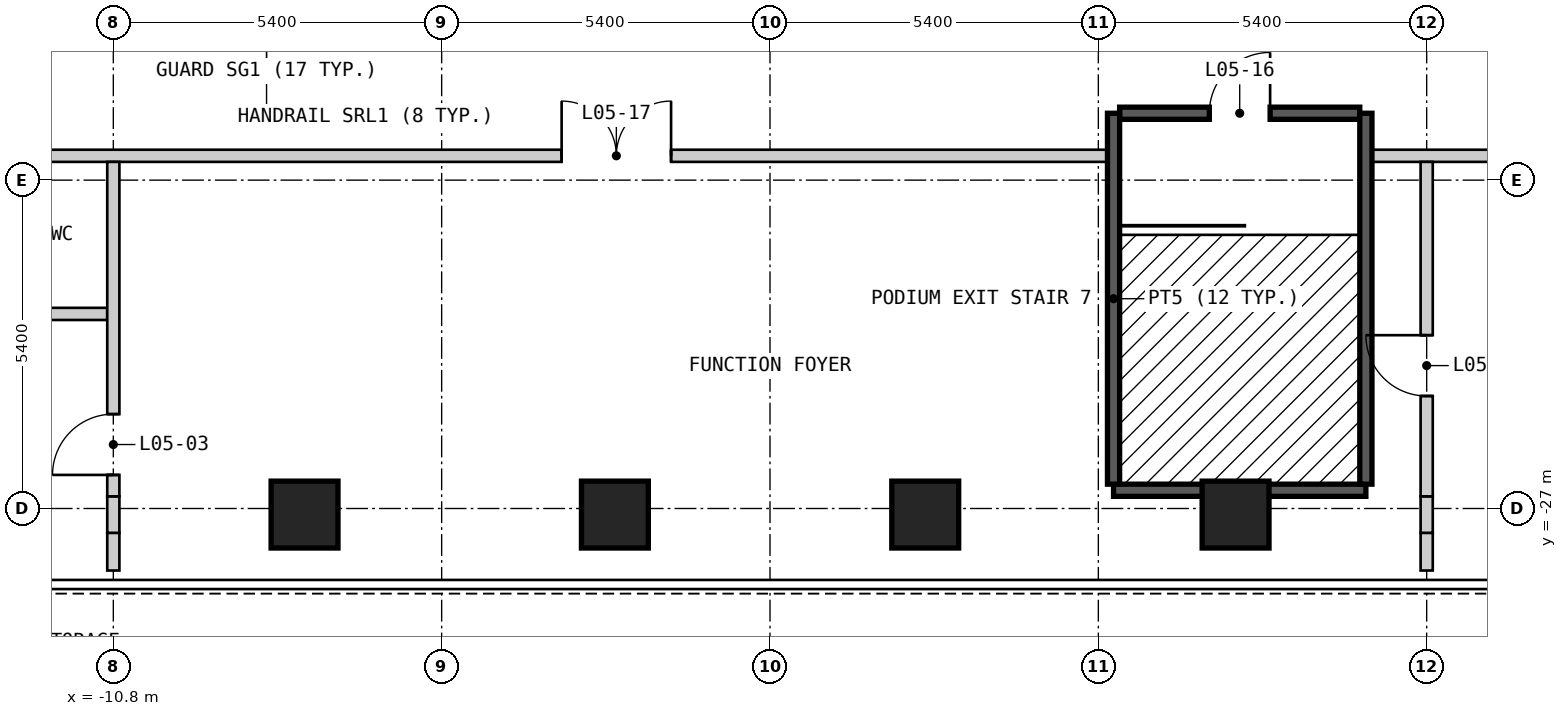
"""IFC4 building model, lengths in metres.
Left out: names, types, materials, properties, quantities, classifications, styles, units other than length and angle.
Written with IfcOpenShell. Run it as: python <this file> out.ifc"""

import sys

from ifc_helpers import new_model, si_unit, direction, frame, frame_2d, origin, origin_2d, place, context, subcontext, project, spatial, rectangle, extrude, element, fill, save


model = new_model("IFC4")
c1 = context("Model", 3, precision=1e-05, world=origin(), true_north=direction((0.0, 1.0)))
c2 = subcontext(c1, "Body", "Model", "MODEL_VIEW")
j1 = project(units=[si_unit("LENGTHUNIT", "METRE"), si_unit("PLANEANGLEUNIT", "RADIAN")], contexts=[c1])
p1 = place(None, origin())
s1 = spatial("IfcSite", under=j1, at=p1, CompositionType="ELEMENT")
p2 = place(p1, origin())
s2 = spatial("IfcBuilding", under=s1, at=p2, CompositionType="ELEMENT")
p3 = place(p2, frame((0.0, 0.0, 19.8)))
s3 = spatial("IfcBuildingStorey", under=s2, at=p3, CompositionType="ELEMENT", Elevation=19.8)
for number, where, z_axis, x_axis in (
    (1, (-7.655, -27.1, 0.0), (0.0, 0.0, 1.0), (1.0, 0.0, 0.0)),
    (2, (-2.551, -27.1, 0.0), (0.0, 0.0, 1.0), (1.0, 0.0, 0.0)),
    (3, (2.553, -27.1, 0.0), (0.0, 0.0, 1.0), (1.0, 0.0, 0.0)),
    (4, (7.657, -27.1, 0.0), (0.0, 0.0, 1.0), (1.0, 0.0, 0.0)),
):
    element("IfcColumn", number, at=place(p3, frame(where, z_axis=z_axis, x_axis=x_axis)), inside=s3, PredefinedType="COLUMN", context=c2, shape_type="SweptSolid", body=[
        extrude(rectangle(XDim=1.1, YDim=1.1, at=origin_2d()), origin(), (0.0, 0.0, 1.0), 3.6),
    ])
p4 = place(p3, frame((5.65, -26.7, 0.0), z_axis=(0.0, 0.0, 1.0), x_axis=(1.0, 0.0, 0.0)))
e5 = element("IfcWall", 5, at=p4, inside=s3, PredefinedType="SOLIDWALL", context=c2, shape_type="SweptSolid", body=[
    extrude(rectangle(XDim=4.15, YDim=0.2, at=frame_2d((2.075, 0.0))), origin(), (0.0, 0.0, 1.0), 2.8),
])
p5 = place(p3, frame((-14.5, -23.8, 0.0), z_axis=(0.0, 0.0, 1.0), x_axis=(1.0, 0.0, 0.0)))
e6 = element("IfcWall", 6, at=p5, inside=s3, PredefinedType="PARTITIONING", context=c2, shape_type="SweptSolid", body=[
    extrude(rectangle(XDim=3.6, YDim=0.2, at=frame_2d((1.8, 0.0))), origin(), (0.0, 0.0, 1.0), 2.8),
])
p6 = place(p3, frame((-18.35, -21.2, 0.0), z_axis=(0.0, 0.0, 1.0), x_axis=(1.0, 0.0, 0.0)))
e7 = element("IfcWall", 7, at=p6, inside=s3, PredefinedType="PARTITIONING", context=c2, shape_type="SweptSolid", body=[
    extrude(rectangle(XDim=24.1, YDim=0.2, at=frame_2d((12.05, 0.0))), origin(), (0.0, 0.0, 1.0), 2.8),
])
p7 = place(p6, frame((2.277, 0.0, 0.0), z_axis=(0.0, 0.0, 1.0), x_axis=(-1.0, 0.0, 0.0)))
e8 = element("IfcOpeningElement", 8, at=p7, cuts=e7, PredefinedType="OPENING", context=c2, shape_type="SweptSolid", body=[
    extrude(rectangle(XDim=0.9, YDim=2.1, at=frame_2d((0.45, 1.05))), frame((0.0, 0.11, 0.0), z_axis=(0.0, -1.0, 0.0), x_axis=(1.0, 0.0, 0.0)), (0.0, 0.0, 1.0), 0.22),
])
p8 = place(p6, frame((6.15, 0.0, 0.0), z_axis=(0.0, 0.0, 1.0), x_axis=(-1.0, 0.0, 0.0)))
e9 = element("IfcOpeningElement", 9, at=p8, cuts=e7, PredefinedType="OPENING", context=c2, shape_type="SweptSolid", body=[
    extrude(rectangle(XDim=1.0, YDim=2.1, at=frame_2d((0.5, 1.05))), frame((0.0, 0.11, 0.0), z_axis=(0.0, -1.0, 0.0), x_axis=(1.0, 0.0, 0.0)), (0.0, 0.0, 1.0), 0.22),
])
p9 = place(p6, frame((14.923, 0.0, 0.0)))
e10 = element("IfcOpeningElement", 10, at=p9, cuts=e7, PredefinedType="OPENING", context=c2, shape_type="SweptSolid", body=[
    extrude(rectangle(XDim=1.8, YDim=2.1, at=frame_2d((0.9, 1.05))), frame((0.0, 0.11, 0.0), z_axis=(0.0, -1.0, 0.0), x_axis=(1.0, 0.0, 0.0)), (0.0, 0.0, 1.0), 0.22),
])
p10 = place(p3, frame((9.7, -21.2, 0.0), z_axis=(0.0, 0.0, 1.0), x_axis=(1.0, 0.0, 0.0)))
e11 = element("IfcWall", 11, at=p10, inside=s3, PredefinedType="PARTITIONING", context=c2, shape_type="SweptSolid", body=[
    extrude(rectangle(XDim=5.7, YDim=0.2, at=frame_2d((2.85, 0.0))), origin(), (0.0, 0.0, 1.0), 2.8),
])
p11 = place(p3, frame((5.75, -20.5, 0.0), z_axis=(0.0, 0.0, 1.0), x_axis=(1.0, 0.0, 0.0)))
e12 = element("IfcWall", 12, at=p11, inside=s3, PredefinedType="SOLIDWALL", context=c2, shape_type="SweptSolid", body=[
    extrude(rectangle(XDim=3.95, YDim=0.2, at=frame_2d((1.975, 0.0))), origin(), (0.0, 0.0, 1.0), 2.8),
])
p12 = place(p11, frame((2.475, 0.0, 0.0), z_axis=(0.0, 0.0, 1.0), x_axis=(-1.0, 0.0, 0.0)))
e13 = element("IfcOpeningElement", 13, at=p12, cuts=e12, PredefinedType="OPENING", context=c2, shape_type="SweptSolid", body=[
    extrude(rectangle(XDim=1.0, YDim=2.1, at=frame_2d((0.5, 1.05))), frame((0.0, 0.11, 0.0), z_axis=(0.0, -1.0, 0.0), x_axis=(1.0, 0.0, 0.0)), (0.0, 0.0, 1.0), 0.22),
])
p13 = place(p3, frame((-10.8, -28.02, 0.0), z_axis=(0.0, 0.0, 1.0), x_axis=(0.0, 1.0, 0.0)))
e14 = element("IfcWall", 14, at=p13, inside=s3, PredefinedType="PARTITIONING", context=c2, shape_type="SweptSolid", body=[
    extrude(rectangle(XDim=0.62, YDim=0.2, at=frame_2d((0.31, 0.0))), origin(), (0.0, 0.0, 1.0), 2.8),
])
p14 = place(p3, frame((-10.8, -27.4, 0.0), z_axis=(0.0, 0.0, 1.0), x_axis=(0.0, 1.0, 0.0)))
e15 = element("IfcWall", 15, at=p14, inside=s3, PredefinedType="PARTITIONING", context=c2, shape_type="SweptSolid", body=[
    extrude(rectangle(XDim=0.6, YDim=0.2, at=frame_2d((0.3, 0.0))), origin(), (0.0, 0.0, 1.0), 2.07),
])
p15 = place(p3, frame((-10.8, -26.8, 0.0), z_axis=(0.0, 0.0, 1.0), x_axis=(0.0, 1.0, 0.0)))
e16 = element("IfcWall", 16, at=p15, inside=s3, PredefinedType="PARTITIONING", context=c2, shape_type="SweptSolid", body=[
    extrude(rectangle(XDim=5.5, YDim=0.2, at=frame_2d((2.75, 0.0))), origin(), (0.0, 0.0, 1.0), 2.8),
])
p16 = place(p15, frame((0.352, 0.0, 0.0)))
e17 = element("IfcOpeningElement", 17, at=p16, cuts=e16, PredefinedType="OPENING", context=c2, shape_type="SweptSolid", body=[
    extrude(rectangle(XDim=1.0, YDim=2.1, at=frame_2d((0.5, 1.05))), frame((0.0, 0.11, 0.0), z_axis=(0.0, -1.0, 0.0), x_axis=(1.0, 0.0, 0.0)), (0.0, 0.0, 1.0), 0.22),
])
for number, where, z_axis, x_axis in (
    (18, (5.65, -26.6, 0.0), (0.0, 0.0, 1.0), (0.0, 1.0, 0.0)),
    (19, (9.8, -26.6, 0.0), (0.0, 0.0, 1.0), (0.0, 1.0, 0.0)),
):
    element("IfcWall", number, at=place(p3, frame(where, z_axis=z_axis, x_axis=x_axis)), inside=s3, PredefinedType="SOLIDWALL", context=c2, shape_type="SweptSolid", body=[
        extrude(rectangle(XDim=6.1, YDim=0.2, at=frame_2d((3.05, 0.0))), origin(), (0.0, 0.0, 1.0), 2.8),
    ])
p17 = place(p3, frame((10.8, -28.02, 0.0), z_axis=(0.0, 0.0, 1.0), x_axis=(0.0, 1.0, 0.0)))
e20 = element("IfcWall", 20, at=p17, inside=s3, PredefinedType="PARTITIONING", context=c2, shape_type="SweptSolid", body=[
    extrude(rectangle(XDim=0.62, YDim=0.2, at=frame_2d((0.31, 0.0))), origin(), (0.0, 0.0, 1.0), 2.8),
])
p18 = place(p3, frame((10.8, -27.4, 0.0), z_axis=(0.0, 0.0, 1.0), x_axis=(0.0, 1.0, 0.0)))
e21 = element("IfcWall", 21, at=p18, inside=s3, PredefinedType="PARTITIONING", context=c2, shape_type="SweptSolid", body=[
    extrude(rectangle(XDim=0.6, YDim=0.2, at=frame_2d((0.3, 0.0))), origin(), (0.0, 0.0, 1.0), 2.07),
])
p19 = place(p3, frame((10.8, -26.8, 0.0), z_axis=(0.0, 0.0, 1.0), x_axis=(0.0, 1.0, 0.0)))
e22 = element("IfcWall", 22, at=p19, inside=s3, PredefinedType="PARTITIONING", context=c2, shape_type="SweptSolid", body=[
    extrude(rectangle(XDim=5.5, YDim=0.2, at=frame_2d((2.75, 0.0))), origin(), (0.0, 0.0, 1.0), 2.8),
])
p20 = place(p19, frame((2.65, 0.0, 0.0), z_axis=(0.0, 0.0, 1.0), x_axis=(-1.0, 0.0, 0.0)))
e23 = element("IfcOpeningElement", 23, at=p20, cuts=e22, PredefinedType="OPENING", context=c2, shape_type="SweptSolid", body=[
    extrude(rectangle(XDim=1.0, YDim=2.1, at=frame_2d((0.5, 1.05))), frame((0.0, 0.11, 0.0), z_axis=(0.0, -1.0, 0.0), x_axis=(1.0, 0.0, 0.0)), (0.0, 0.0, 1.0), 0.22),
])
p21 = place(p16, origin())
e24 = element("IfcDoor", 24, at=p21, inside=s3, OperationType="SINGLE_SWING_LEFT", PredefinedType="DOOR", context=c2, shape_type="SweptSolid", body=[
    extrude(rectangle(XDim=1.0, YDim=2.1, at=frame_2d((0.5, 1.05))), frame((0.0, 0.025, 0.0), z_axis=(0.0, -1.0, 0.0), x_axis=(1.0, 0.0, 0.0)), (0.0, 0.0, 1.0), 0.05),
])
fill(e17, e24)
p22 = place(p20, origin())
e25 = element("IfcDoor", 25, at=p22, inside=s3, OperationType="SINGLE_SWING_LEFT", PredefinedType="DOOR", context=c2, shape_type="SweptSolid", body=[
    extrude(rectangle(XDim=1.0, YDim=2.1, at=frame_2d((0.5, 1.05))), frame((0.0, 0.025, 0.0), z_axis=(0.0, -1.0, 0.0), x_axis=(1.0, 0.0, 0.0)), (0.0, 0.0, 1.0), 0.05),
])
fill(e23, e25)
p23 = place(p12, origin())
e26 = element("IfcDoor", 26, at=p23, inside=s3, OperationType="SINGLE_SWING_LEFT", PredefinedType="DOOR", context=c2, shape_type="SweptSolid", body=[
    extrude(rectangle(XDim=1.0, YDim=2.1, at=frame_2d((0.5, 1.05))), frame((0.0, 0.025, 0.0), z_axis=(0.0, -1.0, 0.0), x_axis=(1.0, 0.0, 0.0)), (0.0, 0.0, 1.0), 0.05),
])
fill(e13, e26)
p24 = place(p9, origin())
e27 = element("IfcDoor", 27, at=p24, inside=s3, OperationType="DOUBLE_DOOR_SINGLE_SWING", PredefinedType="DOOR", context=c2, shape_type="SweptSolid", body=[
    extrude(rectangle(XDim=1.8, YDim=2.1, at=frame_2d((0.9, 1.05))), frame((0.0, 0.025, 0.0), z_axis=(0.0, -1.0, 0.0), x_axis=(1.0, 0.0, 0.0)), (0.0, 0.0, 1.0), 0.05),
])
fill(e10, e27)
save(model, sys.argv[1])
